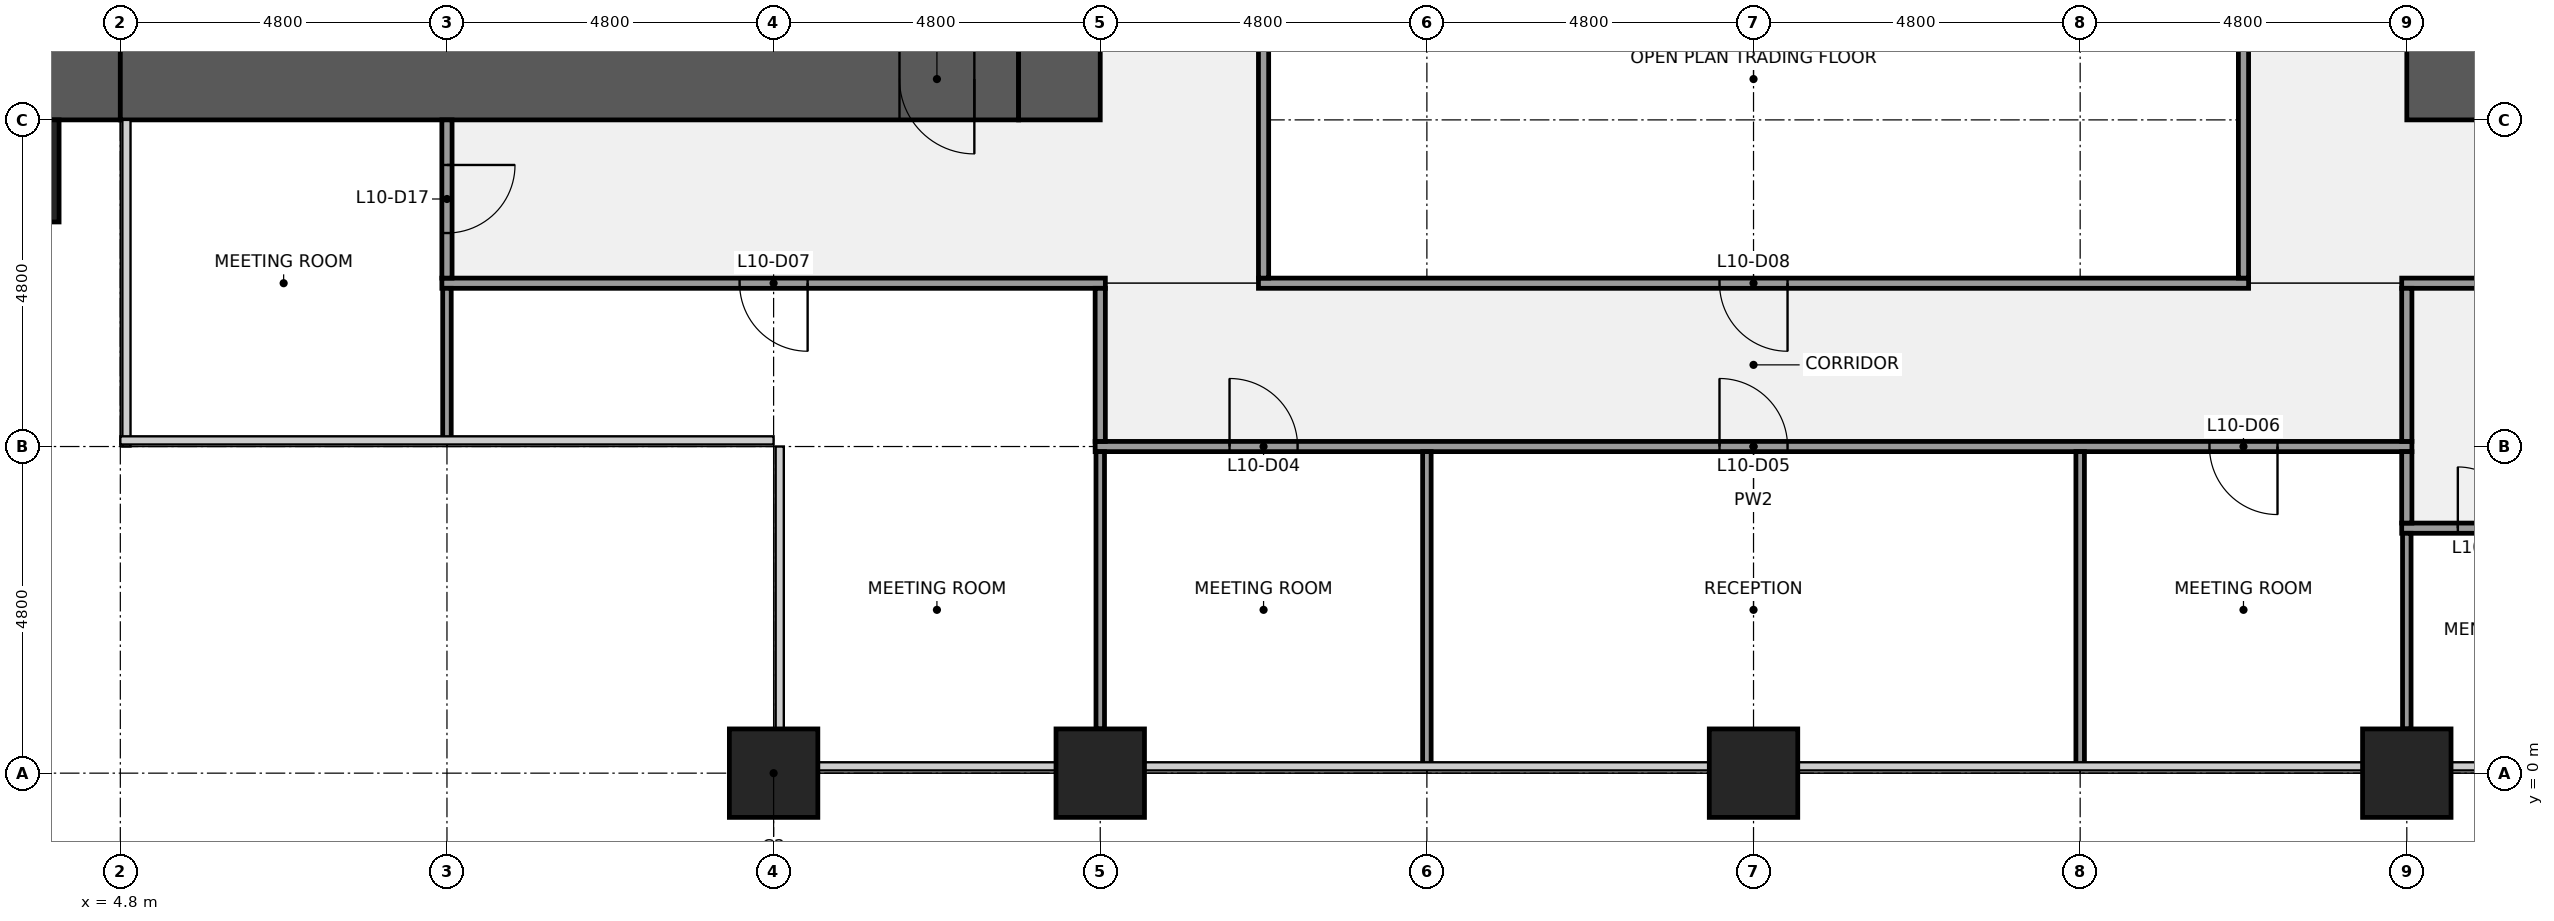
"""IFC4 building model, lengths in metres.
Left out: names, types, materials, properties, quantities, classifications, styles, units other than length and angle.
Written with IfcOpenShell. Run it as: python <this file> out.ifc"""

import sys

from ifc_helpers import new_model, si_unit, direction, frame, frame_2d, origin, origin_2d, place, context, subcontext, project, spatial, rectangle, extrude, element, fill, save


model = new_model("IFC4")
c1 = context("Model", 3, precision=1e-05, world=origin(), true_north=direction((0.0, 1.0)))
c2 = subcontext(c1, "Body", "Model", "MODEL_VIEW")
j1 = project(units=[si_unit("LENGTHUNIT", "METRE"), si_unit("PLANEANGLEUNIT", "RADIAN")], contexts=[c1])
p1 = place(None, origin())
s1 = spatial("IfcSite", under=j1, at=p1, CompositionType="ELEMENT")
p2 = place(p1, origin())
s2 = spatial("IfcBuilding", under=s1, at=p2, CompositionType="ELEMENT")
p3 = place(p2, frame((0.0, 0.0, 51.0)))
s3 = spatial("IfcBuildingStorey", under=s2, at=p3, CompositionType="ELEMENT", Elevation=51.0)
for number, where, z_axis, x_axis in (
    (1, (14.4, 0.0, 0.0), (0.0, 0.0, 1.0), (1.0, 0.0, 0.0)),
    (2, (19.2, 0.0, 0.0), (0.0, 0.0, 1.0), (1.0, 0.0, 0.0)),
    (3, (28.8, 0.0, 0.0), (0.0, 0.0, 1.0), (1.0, 0.0, 0.0)),
    (4, (38.4, 0.0, 0.0), (0.0, 0.0, 1.0), (1.0, 0.0, 0.0)),
):
    element("IfcColumn", number, at=place(p3, frame(where, z_axis=z_axis, x_axis=x_axis)), inside=s3, PredefinedType="COLUMN", context=c2, shape_type="SweptSolid", body=[
        extrude(rectangle(XDim=1.3, YDim=1.3, at=origin_2d()), origin(), (0.0, 0.0, 1.0), 4.0),
    ])
p4 = place(p3, frame((4.8, 10.2, 0.0), z_axis=(0.0, 0.0, 1.0), x_axis=(-1.0, 0.0, 0.0)))
e5 = element("IfcWall", 5, at=p4, inside=s3, PredefinedType="SHEAR", context=c2, shape_type="SweptSolid", body=[
    extrude(rectangle(XDim=3.6, YDim=1.2, at=frame_2d((1.8, 0.0))), origin(), (0.0, 0.0, 1.0), 3.84),
])
p5 = place(p3, frame((18.0, 10.2, 0.0), z_axis=(0.0, 0.0, 1.0), x_axis=(-1.0, 0.0, 0.0)))
e6 = element("IfcWall", 6, at=p5, inside=s3, PredefinedType="SHEAR", context=c2, shape_type="SweptSolid", body=[
    extrude(rectangle(XDim=13.2, YDim=1.2, at=frame_2d((6.6, 0.0))), origin(), (0.0, 0.0, 1.0), 3.84),
])
p6 = place(p5, frame((0.65, 0.0, 0.0)))
e7 = element("IfcOpeningElement", 7, at=p6, cuts=e6, PredefinedType="OPENING", context=c2, shape_type="SweptSolid", body=[
    extrude(rectangle(XDim=1.1, YDim=2.1, at=frame_2d((0.55, 1.05))), frame((0.0, 0.61, 0.0), z_axis=(0.0, -1.0, 0.0), x_axis=(1.0, 0.0, 0.0)), (0.0, 0.0, 1.0), 1.22),
])
p7 = place(p3, frame((18.6, 38.4, 0.0), z_axis=(0.0, 0.0, 1.0), x_axis=(0.0, -1.0, 0.0)))
e8 = element("IfcWall", 8, at=p7, inside=s3, PredefinedType="SHEAR", context=c2, shape_type="SweptSolid", body=[
    extrude(rectangle(XDim=28.8, YDim=1.2, at=frame_2d((14.4, 0.0))), origin(), (0.0, 0.0, 1.0), 3.84),
])
p8 = place(p7, frame((18.3, 0.0, 0.0)))
e9 = element("IfcOpeningElement", 9, at=p8, cuts=e8, PredefinedType="OPENING", context=c2, shape_type="SweptSolid", body=[
    extrude(rectangle(XDim=1.8, YDim=2.1, at=frame_2d((0.9, 1.05))), frame((0.0, 0.61, 0.0), z_axis=(0.0, -1.0, 0.0), x_axis=(1.0, 0.0, 0.0)), (0.0, 0.0, 1.0), 1.22),
])
p9 = place(p7, frame((8.7, 0.0, 0.0)))
e10 = element("IfcOpeningElement", 10, at=p9, cuts=e8, PredefinedType="OPENING", context=c2, shape_type="SweptSolid", body=[
    extrude(rectangle(XDim=1.8, YDim=2.1, at=frame_2d((0.9, 1.05))), frame((0.0, 0.61, 0.0), z_axis=(0.0, -1.0, 0.0), x_axis=(1.0, 0.0, 0.0)), (0.0, 0.0, 1.0), 1.22),
])
p10 = place(p3, frame((39.0, 9.6, 0.0), z_axis=(0.0, 0.0, 1.0), x_axis=(0.0, 1.0, 0.0)))
e11 = element("IfcWall", 11, at=p10, inside=s3, PredefinedType="SHEAR", context=c2, shape_type="SweptSolid", body=[
    extrude(rectangle(XDim=28.8, YDim=1.2, at=frame_2d((14.4, 0.0))), origin(), (0.0, 0.0, 1.0), 3.84),
])
p11 = place(p10, frame((8.7, 0.0, 0.0)))
e12 = element("IfcOpeningElement", 12, at=p11, cuts=e11, PredefinedType="OPENING", context=c2, shape_type="SweptSolid", body=[
    extrude(rectangle(XDim=1.8, YDim=2.1, at=frame_2d((0.9, 1.05))), frame((0.0, 0.61, 0.0), z_axis=(0.0, -1.0, 0.0), x_axis=(1.0, 0.0, 0.0)), (0.0, 0.0, 1.0), 1.22),
])
p12 = place(p10, frame((18.3, 0.0, 0.0)))
e13 = element("IfcOpeningElement", 13, at=p12, cuts=e11, PredefinedType="OPENING", context=c2, shape_type="SweptSolid", body=[
    extrude(rectangle(XDim=1.8, YDim=2.1, at=frame_2d((0.9, 1.05))), frame((0.0, 0.61, 0.0), z_axis=(0.0, -1.0, 0.0), x_axis=(1.0, 0.0, 0.0)), (0.0, 0.0, 1.0), 1.22),
])
p13 = place(p3, frame((38.325, 3.6, 0.0), z_axis=(0.0, 0.0, 1.0), x_axis=(1.0, 0.0, 0.0)))
e14 = element("IfcWall", 14, at=p13, inside=s3, PredefinedType="PARTITIONING", context=c2, shape_type="SweptSolid", body=[
    extrude(rectangle(XDim=7.35, YDim=0.15, at=frame_2d((3.675, 0.0))), origin(), (0.0, 0.0, 1.0), 2.87),
])
p14 = place(p13, frame((0.825, 0.0, 0.0)))
e15 = element("IfcOpeningElement", 15, at=p14, cuts=e14, PredefinedType="OPENING", context=c2, shape_type="SweptSolid", body=[
    extrude(rectangle(XDim=0.9, YDim=2.1, at=frame_2d((0.45, 1.05))), frame((0.0, 0.085, 0.0), z_axis=(0.0, -1.0, 0.0), x_axis=(1.0, 0.0, 0.0)), (0.0, 0.0, 1.0), 0.17),
])
p15 = place(p13, frame((3.225, 0.0, 0.0)))
e16 = element("IfcOpeningElement", 16, at=p15, cuts=e14, PredefinedType="OPENING", context=c2, shape_type="SweptSolid", body=[
    extrude(rectangle(XDim=0.9, YDim=2.1, at=frame_2d((0.45, 1.05))), frame((0.0, 0.085, 0.0), z_axis=(0.0, -1.0, 0.0), x_axis=(1.0, 0.0, 0.0)), (0.0, 0.0, 1.0), 0.17),
])
p16 = place(p13, frame((5.475, 0.0, 0.0)))
e17 = element("IfcOpeningElement", 17, at=p16, cuts=e14, PredefinedType="OPENING", context=c2, shape_type="SweptSolid", body=[
    extrude(rectangle(XDim=1.2, YDim=2.1, at=frame_2d((0.6, 1.05))), frame((0.0, 0.085, 0.0), z_axis=(0.0, -1.0, 0.0), x_axis=(1.0, 0.0, 0.0)), (0.0, 0.0, 1.0), 0.17),
])
p17 = place(p3, frame((19.125, 4.8, 0.0), z_axis=(0.0, 0.0, 1.0), x_axis=(1.0, 0.0, 0.0)))
e18 = element("IfcWall", 18, at=p17, inside=s3, PredefinedType="PARTITIONING", context=c2, shape_type="SweptSolid", body=[
    extrude(rectangle(XDim=19.35, YDim=0.15, at=frame_2d((9.675, 0.0))), origin(), (0.0, 0.0, 1.0), 2.87),
])
p18 = place(p17, frame((1.975, 0.0, 0.0)))
e19 = element("IfcOpeningElement", 19, at=p18, cuts=e18, PredefinedType="OPENING", context=c2, shape_type="SweptSolid", body=[
    extrude(rectangle(XDim=1.0, YDim=2.1, at=frame_2d((0.5, 1.05))), frame((0.0, 0.085, 0.0), z_axis=(0.0, -1.0, 0.0), x_axis=(1.0, 0.0, 0.0)), (0.0, 0.0, 1.0), 0.17),
])
p19 = place(p17, frame((9.175, 0.0, 0.0)))
e20 = element("IfcOpeningElement", 20, at=p19, cuts=e18, PredefinedType="OPENING", context=c2, shape_type="SweptSolid", body=[
    extrude(rectangle(XDim=1.0, YDim=2.1, at=frame_2d((0.5, 1.05))), frame((0.0, 0.085, 0.0), z_axis=(0.0, -1.0, 0.0), x_axis=(1.0, 0.0, 0.0)), (0.0, 0.0, 1.0), 0.17),
])
p20 = place(p17, frame((16.375, 0.0, 0.0)))
e21 = element("IfcOpeningElement", 21, at=p20, cuts=e18, PredefinedType="OPENING", context=c2, shape_type="SweptSolid", body=[
    extrude(rectangle(XDim=1.0, YDim=2.1, at=frame_2d((0.5, 1.05))), frame((0.0, 0.085, 0.0), z_axis=(0.0, -1.0, 0.0), x_axis=(1.0, 0.0, 0.0)), (0.0, 0.0, 1.0), 0.17),
])
p21 = place(p3, frame((9.525, 7.2, 0.0), z_axis=(0.0, 0.0, 1.0), x_axis=(1.0, 0.0, 0.0)))
e22 = element("IfcWall", 22, at=p21, inside=s3, PredefinedType="PARTITIONING", context=c2, shape_type="SweptSolid", body=[
    extrude(rectangle(XDim=9.75, YDim=0.15, at=frame_2d((4.875, 0.0))), origin(), (0.0, 0.0, 1.0), 2.87),
])
p22 = place(p21, frame((4.375, 0.0, 0.0)))
e23 = element("IfcOpeningElement", 23, at=p22, cuts=e22, PredefinedType="OPENING", context=c2, shape_type="SweptSolid", body=[
    extrude(rectangle(XDim=1.0, YDim=2.1, at=frame_2d((0.5, 1.05))), frame((0.0, 0.085, 0.0), z_axis=(0.0, -1.0, 0.0), x_axis=(1.0, 0.0, 0.0)), (0.0, 0.0, 1.0), 0.17),
])
p23 = place(p3, frame((21.525, 7.2, 0.0), z_axis=(0.0, 0.0, 1.0), x_axis=(1.0, 0.0, 0.0)))
e24 = element("IfcWall", 24, at=p23, inside=s3, PredefinedType="PARTITIONING", context=c2, shape_type="SweptSolid", body=[
    extrude(rectangle(XDim=14.55, YDim=0.15, at=frame_2d((7.275, 0.0))), origin(), (0.0, 0.0, 1.0), 2.87),
])
p24 = place(p23, frame((6.775, 0.0, 0.0)))
e25 = element("IfcOpeningElement", 25, at=p24, cuts=e24, PredefinedType="OPENING", context=c2, shape_type="SweptSolid", body=[
    extrude(rectangle(XDim=1.0, YDim=2.1, at=frame_2d((0.5, 1.05))), frame((0.0, 0.085, 0.0), z_axis=(0.0, -1.0, 0.0), x_axis=(1.0, 0.0, 0.0)), (0.0, 0.0, 1.0), 0.17),
])
p25 = place(p3, frame((38.325, 7.2, 0.0), z_axis=(0.0, 0.0, 1.0), x_axis=(1.0, 0.0, 0.0)))
e26 = element("IfcWall", 26, at=p25, inside=s3, PredefinedType="PARTITIONING", context=c2, shape_type="SweptSolid", body=[
    extrude(rectangle(XDim=9.75, YDim=0.15, at=frame_2d((4.875, 0.0))), origin(), (0.0, 0.0, 1.0), 2.87),
])
p26 = place(p25, frame((3.175, 0.0, 0.0)))
e27 = element("IfcOpeningElement", 27, at=p26, cuts=e26, PredefinedType="OPENING", context=c2, shape_type="SweptSolid", body=[
    extrude(rectangle(XDim=1.0, YDim=2.1, at=frame_2d((0.5, 1.05))), frame((0.0, 0.085, 0.0), z_axis=(0.0, -1.0, 0.0), x_axis=(1.0, 0.0, 0.0)), (0.0, 0.0, 1.0), 0.17),
])
p27 = place(p25, frame((7.975, 0.0, 0.0)))
e28 = element("IfcOpeningElement", 28, at=p27, cuts=e26, PredefinedType="OPENING", context=c2, shape_type="SweptSolid", body=[
    extrude(rectangle(XDim=1.0, YDim=2.1, at=frame_2d((0.5, 1.05))), frame((0.0, 0.085, 0.0), z_axis=(0.0, -1.0, 0.0), x_axis=(1.0, 0.0, 0.0)), (0.0, 0.0, 1.0), 0.17),
])
p28 = place(p3, frame((9.6, 4.9, 0.0), z_axis=(0.0, 0.0, 1.0), x_axis=(0.0, 1.0, 0.0)))
e29 = element("IfcWall", 29, at=p28, inside=s3, PredefinedType="PARTITIONING", context=c2, shape_type="SweptSolid", body=[
    extrude(rectangle(XDim=2.225, YDim=0.125, at=frame_2d((1.113, 0.0))), origin(), (0.0, 0.0, 1.0), 2.87),
])
p29 = place(p3, frame((9.6, 7.275, 0.0), z_axis=(0.0, 0.0, 1.0), x_axis=(0.0, 1.0, 0.0)))
e30 = element("IfcWall", 30, at=p29, inside=s3, PredefinedType="PARTITIONING", context=c2, shape_type="SweptSolid", body=[
    extrude(rectangle(XDim=2.325, YDim=0.15, at=frame_2d((1.163, 0.0))), origin(), (0.0, 0.0, 1.0), 2.87),
])
p30 = place(p29, frame((0.663, 0.0, 0.0)))
e31 = element("IfcOpeningElement", 31, at=p30, cuts=e30, PredefinedType="OPENING", context=c2, shape_type="SweptSolid", body=[
    extrude(rectangle(XDim=1.0, YDim=2.1, at=frame_2d((0.5, 1.05))), frame((0.0, 0.085, 0.0), z_axis=(0.0, -1.0, 0.0), x_axis=(1.0, 0.0, 0.0)), (0.0, 0.0, 1.0), 0.17),
])
p31 = place(p3, frame((19.2, 0.65, 0.0), z_axis=(0.0, 0.0, 1.0), x_axis=(0.0, 1.0, 0.0)))
e32 = element("IfcWall", 32, at=p31, inside=s3, PredefinedType="PARTITIONING", context=c2, shape_type="SweptSolid", body=[
    extrude(rectangle(XDim=4.075, YDim=0.125, at=frame_2d((2.038, 0.0))), origin(), (0.0, 0.0, 1.0), 2.87),
])
p32 = place(p3, frame((19.2, 4.875, 0.0), z_axis=(0.0, 0.0, 1.0), x_axis=(0.0, 1.0, 0.0)))
e33 = element("IfcWall", 33, at=p32, inside=s3, PredefinedType="PARTITIONING", context=c2, shape_type="SweptSolid", body=[
    extrude(rectangle(XDim=2.25, YDim=0.15, at=frame_2d((1.125, 0.0))), origin(), (0.0, 0.0, 1.0), 2.87),
])
p33 = place(p3, frame((21.6, 7.275, 0.0), z_axis=(0.0, 0.0, 1.0), x_axis=(0.0, 1.0, 0.0)))
e34 = element("IfcWall", 34, at=p33, inside=s3, PredefinedType="PARTITIONING", context=c2, shape_type="SweptSolid", body=[
    extrude(rectangle(XDim=5.863, YDim=0.15, at=frame_2d((2.931, 0.0))), origin(), (0.0, 0.0, 1.0), 2.87),
])
for number, where, z_axis, x_axis in (
    (35, (24.0, 0.1, 0.0), (0.0, 0.0, 1.0), (0.0, 1.0, 0.0)),
    (36, (33.6, 0.1, 0.0), (0.0, 0.0, 1.0), (0.0, 1.0, 0.0)),
):
    element("IfcWall", number, at=place(p3, frame(where, z_axis=z_axis, x_axis=x_axis)), inside=s3, PredefinedType="PARTITIONING", context=c2, shape_type="SweptSolid", body=[
        extrude(rectangle(XDim=4.625, YDim=0.125, at=frame_2d((2.312, 0.0))), origin(), (0.0, 0.0, 1.0), 2.87),
    ])
p34 = place(p3, frame((36.0, 7.275, 0.0), z_axis=(0.0, 0.0, 1.0), x_axis=(0.0, 1.0, 0.0)))
e37 = element("IfcWall", 37, at=p34, inside=s3, PredefinedType="PARTITIONING", context=c2, shape_type="SweptSolid", body=[
    extrude(rectangle(XDim=5.863, YDim=0.15, at=frame_2d((2.931, 0.0))), origin(), (0.0, 0.0, 1.0), 2.87),
])
p35 = place(p3, frame((38.4, 0.65, 0.0), z_axis=(0.0, 0.0, 1.0), x_axis=(0.0, 1.0, 0.0)))
e38 = element("IfcWall", 38, at=p35, inside=s3, PredefinedType="PARTITIONING", context=c2, shape_type="SweptSolid", body=[
    extrude(rectangle(XDim=2.875, YDim=0.125, at=frame_2d((1.438, 0.0))), origin(), (0.0, 0.0, 1.0), 2.87),
])
p36 = place(p3, frame((38.4, 3.675, 0.0), z_axis=(0.0, 0.0, 1.0), x_axis=(0.0, 1.0, 0.0)))
e39 = element("IfcWall", 39, at=p36, inside=s3, PredefinedType="PARTITIONING", context=c2, shape_type="SweptSolid", body=[
    extrude(rectangle(XDim=1.05, YDim=0.15, at=frame_2d((0.525, 0.0))), origin(), (0.0, 0.0, 1.0), 2.87),
])
p37 = place(p3, frame((38.4, 4.875, 0.0), z_axis=(0.0, 0.0, 1.0), x_axis=(0.0, 1.0, 0.0)))
e40 = element("IfcWall", 40, at=p37, inside=s3, PredefinedType="PARTITIONING", context=c2, shape_type="SweptSolid", body=[
    extrude(rectangle(XDim=2.25, YDim=0.15, at=frame_2d((1.125, 0.0))), origin(), (0.0, 0.0, 1.0), 2.87),
])
p38 = place(p3, frame((2.4, 8.85, 0.0), z_axis=(0.0, 0.0, 1.0), x_axis=(1.0, 0.0, 0.0)))
e41 = element("IfcColumn", 41, at=p38, inside=s3, PredefinedType="PILASTER", context=c2, shape_type="SweptSolid", body=[
    extrude(rectangle(XDim=3.0, YDim=1.5, at=origin_2d()), origin(), (0.0, 0.0, 1.0), 4.0),
])
for number, where, z_axis, x_axis in (
    (42, (14.4, -1.075, 0.0), (0.0, 0.0, 1.0), (1.0, 0.0, 0.0)),
    (43, (19.2, -1.075, 0.0), (0.0, 0.0, 1.0), (1.0, 0.0, 0.0)),
    (44, (38.4, -1.075, 0.0), (0.0, 0.0, 1.0), (1.0, 0.0, 0.0)),
):
    element("IfcColumn", number, at=place(p3, frame(where, z_axis=z_axis, x_axis=x_axis)), inside=s3, PredefinedType="PILASTER", context=c2, shape_type="SweptSolid", body=[
        extrude(rectangle(XDim=4.2, YDim=0.85, at=origin_2d()), origin(), (0.0, 0.0, 1.0), 4.0),
    ])
p39 = place(p6, origin())
e45 = element("IfcDoor", 45, at=p39, inside=s3, OperationType="SINGLE_SWING_LEFT", PredefinedType="DOOR", context=c2, shape_type="SweptSolid", body=[
    extrude(rectangle(XDim=1.1, YDim=2.1, at=frame_2d((0.55, 1.05))), frame((0.0, 0.025, 0.0), z_axis=(0.0, -1.0, 0.0), x_axis=(1.0, 0.0, 0.0)), (0.0, 0.0, 1.0), 0.05),
])
fill(e7, e45)
p40 = place(p14, origin())
e46 = element("IfcDoor", 46, at=p40, inside=s3, OperationType="SINGLE_SWING_LEFT", PredefinedType="DOOR", context=c2, shape_type="SweptSolid", body=[
    extrude(rectangle(XDim=0.9, YDim=2.1, at=frame_2d((0.45, 1.05))), frame((0.0, 0.025, 0.0), z_axis=(0.0, -1.0, 0.0), x_axis=(1.0, 0.0, 0.0)), (0.0, 0.0, 1.0), 0.05),
])
fill(e15, e46)
p41 = place(p18, origin())
e47 = element("IfcDoor", 47, at=p41, inside=s3, OperationType="SINGLE_SWING_LEFT", PredefinedType="DOOR", context=c2, shape_type="SweptSolid", body=[
    extrude(rectangle(XDim=1.0, YDim=2.1, at=frame_2d((0.5, 1.05))), frame((0.0, 0.025, 0.0), z_axis=(0.0, -1.0, 0.0), x_axis=(1.0, 0.0, 0.0)), (0.0, 0.0, 1.0), 0.05),
])
fill(e19, e47)
p42 = place(p19, origin())
e48 = element("IfcDoor", 48, at=p42, inside=s3, OperationType="SINGLE_SWING_LEFT", PredefinedType="DOOR", context=c2, shape_type="SweptSolid", body=[
    extrude(rectangle(XDim=1.0, YDim=2.1, at=frame_2d((0.5, 1.05))), frame((0.0, 0.025, 0.0), z_axis=(0.0, -1.0, 0.0), x_axis=(1.0, 0.0, 0.0)), (0.0, 0.0, 1.0), 0.05),
])
fill(e20, e48)
p43 = place(p20, origin())
e49 = element("IfcDoor", 49, at=p43, inside=s3, OperationType="SINGLE_SWING_RIGHT", PredefinedType="DOOR", context=c2, shape_type="SweptSolid", body=[
    extrude(rectangle(XDim=1.0, YDim=2.1, at=frame_2d((0.5, 1.05))), frame((0.0, 0.025, 0.0), z_axis=(0.0, -1.0, 0.0), x_axis=(1.0, 0.0, 0.0)), (0.0, 0.0, 1.0), 0.05),
])
fill(e21, e49)
p44 = place(p22, origin())
e50 = element("IfcDoor", 50, at=p44, inside=s3, OperationType="SINGLE_SWING_RIGHT", PredefinedType="DOOR", context=c2, shape_type="SweptSolid", body=[
    extrude(rectangle(XDim=1.0, YDim=2.1, at=frame_2d((0.5, 1.05))), frame((0.0, 0.025, 0.0), z_axis=(0.0, -1.0, 0.0), x_axis=(1.0, 0.0, 0.0)), (0.0, 0.0, 1.0), 0.05),
])
fill(e23, e50)
p45 = place(p24, origin())
e51 = element("IfcDoor", 51, at=p45, inside=s3, OperationType="SINGLE_SWING_RIGHT", PredefinedType="DOOR", context=c2, shape_type="SweptSolid", body=[
    extrude(rectangle(XDim=1.0, YDim=2.1, at=frame_2d((0.5, 1.05))), frame((0.0, 0.025, 0.0), z_axis=(0.0, -1.0, 0.0), x_axis=(1.0, 0.0, 0.0)), (0.0, 0.0, 1.0), 0.05),
])
fill(e25, e51)
p46 = place(p30, origin())
e52 = element("IfcDoor", 52, at=p46, inside=s3, OperationType="SINGLE_SWING_RIGHT", PredefinedType="DOOR", context=c2, shape_type="SweptSolid", body=[
    extrude(rectangle(XDim=1.0, YDim=2.1, at=frame_2d((0.5, 1.05))), frame((0.0, 0.025, 0.0), z_axis=(0.0, -1.0, 0.0), x_axis=(1.0, 0.0, 0.0)), (0.0, 0.0, 1.0), 0.05),
])
fill(e31, e52)
save(model, sys.argv[1])
